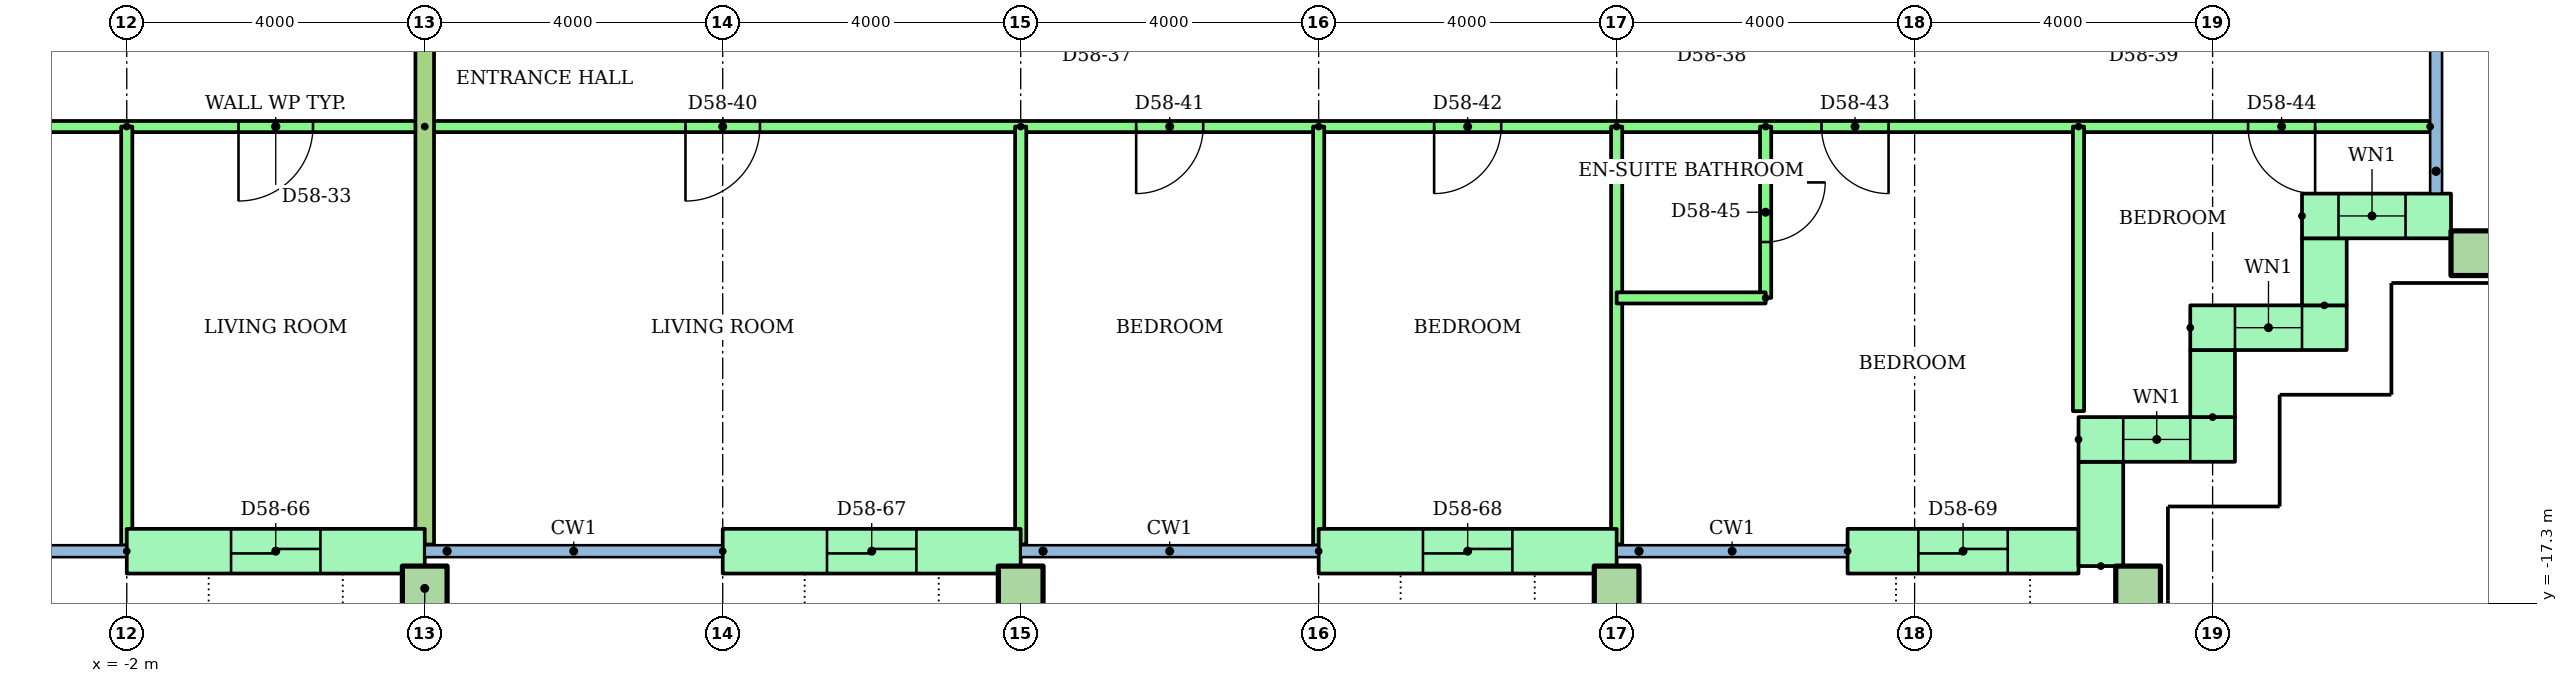
"""IFC4 building model, lengths in metres.
Left out: names, types, materials, properties, quantities, classifications, styles, units other than length and angle.
Written with IfcOpenShell. Run it as: python <this file> out.ifc"""

import sys

from ifc_helpers import new_model, si_unit, direction, frame, frame_2d, origin, origin_2d, place, context, subcontext, project, spatial, rectangle, hollow_rectangle, extrude, element, fill, save


model = new_model("IFC4")
c1 = context("Model", 3, precision=1e-05, world=origin(), true_north=direction((0.0, 1.0)))
c2 = subcontext(c1, "Body", "Model", "MODEL_VIEW")
j1 = project(units=[si_unit("LENGTHUNIT", "METRE"), si_unit("PLANEANGLEUNIT", "RADIAN")], contexts=[c1])
p1 = place(None, origin())
s1 = spatial("IfcSite", under=j1, at=p1, CompositionType="ELEMENT")
p2 = place(p1, origin())
s2 = spatial("IfcBuilding", under=s1, at=p2, CompositionType="ELEMENT")
p3 = place(p2, frame((0.0, 0.0, 223.6)))
s3 = spatial("IfcBuildingStorey", under=s2, at=p3, CompositionType="ELEMENT", Elevation=223.6)
for number, where in (
    (1, (2.0, -17.1, 0.0)),
    (2, (10.0, -17.1, 0.0)),
    (3, (18.0, -17.1, 0.0)),
    (4, (25.0, -17.1, 0.0)),
    (5, (29.5, -12.6, 0.0)),
):
    element("IfcColumn", number, at=place(p3, frame(where)), inside=s3, PredefinedType="COLUMN", context=c2, shape_type="SweptSolid", body=[
        extrude(hollow_rectangle(XDim=0.6, YDim=0.6, WallThickness=0.03, at=origin_2d()), origin(), (0.0, 0.0, 1.0), 3.2),
    ])
p4 = place(p3, frame((-2.0, -16.6, 0.0)))
e6 = element("IfcWall", 6, at=p4, inside=s3, PredefinedType="STANDARD", context=c2, shape_type="SweptSolid", body=[
    extrude(rectangle(XDim=4.0, YDim=0.6, at=frame_2d((2.0, 0.0))), origin(), (0.0, 0.0, 1.0), 2.92),
])
p5 = place(p4, frame((1.4, 0.0, 0.0)))
e7 = element("IfcOpeningElement", 7, at=p5, cuts=e6, PredefinedType="OPENING", context=c2, shape_type="SweptSolid", body=[
    extrude(rectangle(XDim=1.2, YDim=2.1, at=frame_2d((0.6, 1.05))), frame((0.0, 0.31, 0.0), z_axis=(0.0, -1.0, 0.0), x_axis=(1.0, 0.0, 0.0)), (0.0, 0.0, 1.0), 0.62),
])
p6 = place(p3, frame((6.0, -16.6, 0.0)))
e8 = element("IfcWall", 8, at=p6, inside=s3, PredefinedType="STANDARD", context=c2, shape_type="SweptSolid", body=[
    extrude(rectangle(XDim=4.0, YDim=0.6, at=frame_2d((2.0, 0.0))), origin(), (0.0, 0.0, 1.0), 2.92),
])
p7 = place(p6, frame((1.4, 0.0, 0.0)))
e9 = element("IfcOpeningElement", 9, at=p7, cuts=e8, PredefinedType="OPENING", context=c2, shape_type="SweptSolid", body=[
    extrude(rectangle(XDim=1.2, YDim=2.1, at=frame_2d((0.6, 1.05))), frame((0.0, 0.31, 0.0), z_axis=(0.0, -1.0, 0.0), x_axis=(1.0, 0.0, 0.0)), (0.0, 0.0, 1.0), 0.62),
])
p8 = place(p3, frame((14.0, -16.6, 0.0)))
e10 = element("IfcWall", 10, at=p8, inside=s3, PredefinedType="STANDARD", context=c2, shape_type="SweptSolid", body=[
    extrude(rectangle(XDim=4.0, YDim=0.6, at=frame_2d((2.0, 0.0))), origin(), (0.0, 0.0, 1.0), 2.92),
])
p9 = place(p8, frame((1.4, 0.0, 0.0)))
e11 = element("IfcOpeningElement", 11, at=p9, cuts=e10, PredefinedType="OPENING", context=c2, shape_type="SweptSolid", body=[
    extrude(rectangle(XDim=1.2, YDim=2.1, at=frame_2d((0.6, 1.05))), frame((0.0, 0.31, 0.0), z_axis=(0.0, -1.0, 0.0), x_axis=(1.0, 0.0, 0.0)), (0.0, 0.0, 1.0), 0.62),
])
p10 = place(p3, frame((21.1, -16.6, 0.0)))
e12 = element("IfcWall", 12, at=p10, inside=s3, PredefinedType="STANDARD", context=c2, shape_type="SweptSolid", body=[
    extrude(rectangle(XDim=3.1, YDim=0.6, at=frame_2d((1.55, 0.0))), origin(), (0.0, 0.0, 1.0), 2.92),
])
p11 = place(p10, frame((0.95, 0.0, 0.0)))
e13 = element("IfcOpeningElement", 13, at=p11, cuts=e12, PredefinedType="OPENING", context=c2, shape_type="SweptSolid", body=[
    extrude(rectangle(XDim=1.2, YDim=2.1, at=frame_2d((0.6, 1.05))), frame((0.0, 0.31, 0.0), z_axis=(0.0, -1.0, 0.0), x_axis=(1.0, 0.0, 0.0)), (0.0, 0.0, 1.0), 0.62),
])
p12 = place(p3, frame((24.5, -16.8, 0.0), z_axis=(0.0, 0.0, 1.0), x_axis=(0.0, 1.0, 0.0)))
e14 = element("IfcWall", 14, at=p12, inside=s3, PredefinedType="STANDARD", context=c2, shape_type="SweptSolid", body=[
    extrude(rectangle(XDim=1.4, YDim=0.6, at=frame_2d((0.7, 0.0))), origin(), (0.0, 0.0, 1.0), 2.92),
])
p13 = place(p3, frame((24.2, -15.1, 0.0)))
e15 = element("IfcWall", 15, at=p13, inside=s3, PredefinedType="STANDARD", context=c2, shape_type="SweptSolid", body=[
    extrude(rectangle(XDim=2.1, YDim=0.6, at=frame_2d((1.05, 0.0))), origin(), (0.0, 0.0, 1.0), 2.92),
])
p14 = place(p13, frame((0.6, 0.0, 0.9)))
e16 = element("IfcOpeningElement", 16, at=p14, cuts=e15, PredefinedType="OPENING", context=c2, shape_type="SweptSolid", body=[
    extrude(rectangle(XDim=0.9, YDim=1.5, at=frame_2d((0.45, 0.75))), frame((0.0, 0.31, 0.0), z_axis=(0.0, -1.0, 0.0), x_axis=(1.0, 0.0, 0.0)), (0.0, 0.0, 1.0), 0.62),
])
p15 = place(p3, frame((26.0, -14.8, 0.0), z_axis=(0.0, 0.0, 1.0), x_axis=(0.0, 1.0, 0.0)))
e17 = element("IfcWall", 17, at=p15, inside=s3, PredefinedType="STANDARD", context=c2, shape_type="SweptSolid", body=[
    extrude(rectangle(XDim=0.9, YDim=0.6, at=frame_2d((0.45, 0.0))), origin(), (0.0, 0.0, 1.0), 2.92),
])
p16 = place(p3, frame((25.7, -13.6, 0.0)))
e18 = element("IfcWall", 18, at=p16, inside=s3, PredefinedType="STANDARD", context=c2, shape_type="SweptSolid", body=[
    extrude(rectangle(XDim=2.1, YDim=0.6, at=frame_2d((1.05, 0.0))), origin(), (0.0, 0.0, 1.0), 2.92),
])
p17 = place(p16, frame((0.6, 0.0, 0.9)))
e19 = element("IfcOpeningElement", 19, at=p17, cuts=e18, PredefinedType="OPENING", context=c2, shape_type="SweptSolid", body=[
    extrude(rectangle(XDim=0.9, YDim=1.5, at=frame_2d((0.45, 0.75))), frame((0.0, 0.31, 0.0), z_axis=(0.0, -1.0, 0.0), x_axis=(1.0, 0.0, 0.0)), (0.0, 0.0, 1.0), 0.62),
])
p18 = place(p3, frame((27.5, -13.3, 0.0), z_axis=(0.0, 0.0, 1.0), x_axis=(0.0, 1.0, 0.0)))
e20 = element("IfcWall", 20, at=p18, inside=s3, PredefinedType="STANDARD", context=c2, shape_type="SweptSolid", body=[
    extrude(rectangle(XDim=0.9, YDim=0.6, at=frame_2d((0.45, 0.0))), origin(), (0.0, 0.0, 1.0), 2.92),
])
p19 = place(p3, frame((27.2, -12.1, 0.0)))
e21 = element("IfcWall", 21, at=p19, inside=s3, PredefinedType="STANDARD", context=c2, shape_type="SweptSolid", body=[
    extrude(rectangle(XDim=2.0, YDim=0.6, at=frame_2d((1.0, 0.0))), origin(), (0.0, 0.0, 1.0), 2.92),
])
p20 = place(p19, frame((0.49, 0.0, 0.9)))
e22 = element("IfcOpeningElement", 22, at=p20, cuts=e21, PredefinedType="OPENING", context=c2, shape_type="SweptSolid", body=[
    extrude(rectangle(XDim=0.9, YDim=1.5, at=frame_2d((0.45, 0.75))), frame((0.0, 0.31, 0.0), z_axis=(0.0, -1.0, 0.0), x_axis=(1.0, 0.0, 0.0)), (0.0, 0.0, 1.0), 0.62),
])
p21 = place(p3, frame((2.0, -10.9, 0.0), z_axis=(0.0, 0.0, 1.0), x_axis=(-1.0, 0.0, 0.0)))
e23 = element("IfcWall", 23, at=p21, inside=s3, PredefinedType="PARTITIONING", context=c2, shape_type="SweptSolid", body=[
    extrude(rectangle(XDim=8.0, YDim=0.15, at=frame_2d((4.0, 0.0))), origin(), (0.0, 0.0, 1.0), 2.4),
])
p22 = place(p21, frame((5.55, 0.0, 0.0)))
e24 = element("IfcOpeningElement", 24, at=p22, cuts=e23, PredefinedType="OPENING", context=c2, shape_type="SweptSolid", body=[
    extrude(rectangle(XDim=0.9, YDim=2.1, at=frame_2d((0.45, 1.05))), frame((0.0, 0.085, 0.0), z_axis=(0.0, -1.0, 0.0), x_axis=(1.0, 0.0, 0.0)), (0.0, 0.0, 1.0), 0.17),
])
p23 = place(p21, frame((1.5, 0.0, 0.0)))
e25 = element("IfcOpeningElement", 25, at=p23, cuts=e23, PredefinedType="OPENING", context=c2, shape_type="SweptSolid", body=[
    extrude(rectangle(XDim=1.0, YDim=2.1, at=frame_2d((0.5, 1.05))), frame((0.0, 0.085, 0.0), z_axis=(0.0, -1.0, 0.0), x_axis=(1.0, 0.0, 0.0)), (0.0, 0.0, 1.0), 0.17),
])
p24 = place(p3, frame((-2.0, -10.9, 0.0), z_axis=(0.0, 0.0, 1.0), x_axis=(0.0, -1.0, 0.0)))
e26 = element("IfcWall", 26, at=p24, inside=s3, PredefinedType="PARTITIONING", context=c2, shape_type="SweptSolid", body=[
    extrude(rectangle(XDim=5.621, YDim=0.15, at=frame_2d((2.811, 0.0))), origin(), (0.0, 0.0, 1.0), 2.4),
])
p25 = place(p3, frame((28.92, -10.9, 0.0), z_axis=(0.0, 0.0, 1.0), x_axis=(-1.0, 0.0, 0.0)))
e27 = element("IfcWall", 27, at=p25, inside=s3, PredefinedType="PARTITIONING", context=c2, shape_type="SweptSolid", body=[
    extrude(rectangle(XDim=26.92, YDim=0.15, at=frame_2d((13.46, 0.0))), origin(), (0.0, 0.0, 1.0), 2.4),
])
p26 = place(p25, frame((22.42, 0.0, 0.0)))
e28 = element("IfcOpeningElement", 28, at=p26, cuts=e27, PredefinedType="OPENING", context=c2, shape_type="SweptSolid", body=[
    extrude(rectangle(XDim=1.0, YDim=2.1, at=frame_2d((0.5, 1.05))), frame((0.0, 0.085, 0.0), z_axis=(0.0, -1.0, 0.0), x_axis=(1.0, 0.0, 0.0)), (0.0, 0.0, 1.0), 0.17),
])
p27 = place(p25, frame((16.47, 0.0, 0.0)))
e29 = element("IfcOpeningElement", 29, at=p27, cuts=e27, PredefinedType="OPENING", context=c2, shape_type="SweptSolid", body=[
    extrude(rectangle(XDim=0.9, YDim=2.1, at=frame_2d((0.45, 1.05))), frame((0.0, 0.085, 0.0), z_axis=(0.0, -1.0, 0.0), x_axis=(1.0, 0.0, 0.0)), (0.0, 0.0, 1.0), 0.17),
])
p28 = place(p25, frame((12.47, 0.0, 0.0)))
e30 = element("IfcOpeningElement", 30, at=p28, cuts=e27, PredefinedType="OPENING", context=c2, shape_type="SweptSolid", body=[
    extrude(rectangle(XDim=0.9, YDim=2.1, at=frame_2d((0.45, 1.05))), frame((0.0, 0.085, 0.0), z_axis=(0.0, -1.0, 0.0), x_axis=(1.0, 0.0, 0.0)), (0.0, 0.0, 1.0), 0.17),
])
p29 = place(p25, frame((7.27, 0.0, 0.0)))
e31 = element("IfcOpeningElement", 31, at=p29, cuts=e27, PredefinedType="OPENING", context=c2, shape_type="SweptSolid", body=[
    extrude(rectangle(XDim=0.9, YDim=2.1, at=frame_2d((0.45, 1.05))), frame((0.0, 0.085, 0.0), z_axis=(0.0, -1.0, 0.0), x_axis=(1.0, 0.0, 0.0)), (0.0, 0.0, 1.0), 0.17),
])
p30 = place(p25, frame((1.544, 0.0, 0.0)))
e32 = element("IfcOpeningElement", 32, at=p30, cuts=e27, PredefinedType="OPENING", context=c2, shape_type="SweptSolid", body=[
    extrude(rectangle(XDim=0.9, YDim=2.1, at=frame_2d((0.45, 1.05))), frame((0.0, 0.085, 0.0), z_axis=(0.0, -1.0, 0.0), x_axis=(1.0, 0.0, 0.0)), (0.0, 0.0, 1.0), 0.17),
])
p31 = place(p3, frame((10.0, -10.9, 0.0), z_axis=(0.0, 0.0, 1.0), x_axis=(0.0, -1.0, 0.0)))
e33 = element("IfcWall", 33, at=p31, inside=s3, PredefinedType="PARTITIONING", context=c2, shape_type="SweptSolid", body=[
    extrude(rectangle(XDim=5.61, YDim=0.15, at=frame_2d((2.805, 0.0))), origin(), (0.0, 0.0, 1.0), 2.4),
])
p32 = place(p3, frame((14.0, -10.9, 0.0), z_axis=(0.0, 0.0, 1.0), x_axis=(0.0, -1.0, 0.0)))
e34 = element("IfcWall", 34, at=p32, inside=s3, PredefinedType="PARTITIONING", context=c2, shape_type="SweptSolid", body=[
    extrude(rectangle(XDim=5.621, YDim=0.15, at=frame_2d((2.811, 0.0))), origin(), (0.0, 0.0, 1.0), 2.4),
])
p33 = place(p3, frame((18.0, -10.9, 0.0), z_axis=(0.0, 0.0, 1.0), x_axis=(0.0, -1.0, 0.0)))
e35 = element("IfcWall", 35, at=p33, inside=s3, PredefinedType="PARTITIONING", context=c2, shape_type="SweptSolid", body=[
    extrude(rectangle(XDim=5.61, YDim=0.15, at=frame_2d((2.805, 0.0))), origin(), (0.0, 0.0, 1.0), 2.4),
])
p34 = place(p3, frame((24.2, -10.9, 0.0), z_axis=(0.0, 0.0, 1.0), x_axis=(0.0, -1.0, 0.0)))
e36 = element("IfcWall", 36, at=p34, inside=s3, PredefinedType="PARTITIONING", context=c2, shape_type="SweptSolid", body=[
    extrude(rectangle(XDim=3.82, YDim=0.15, at=frame_2d((1.91, 0.0))), origin(), (0.0, 0.0, 1.0), 2.4),
])
p35 = place(p3, frame((20.0, -10.9, 0.0), z_axis=(0.0, 0.0, 1.0), x_axis=(0.0, -1.0, 0.0)))
e37 = element("IfcWall", 37, at=p35, inside=s3, PredefinedType="PARTITIONING", context=c2, shape_type="SweptSolid", body=[
    extrude(rectangle(XDim=2.3, YDim=0.15, at=frame_2d((1.15, 0.0))), origin(), (0.0, 0.0, 1.0), 2.4),
])
p36 = place(p35, frame((0.75, 0.0, 0.0)))
e38 = element("IfcOpeningElement", 38, at=p36, cuts=e37, PredefinedType="OPENING", context=c2, shape_type="SweptSolid", body=[
    extrude(rectangle(XDim=0.8, YDim=2.1, at=frame_2d((0.4, 1.05))), frame((0.0, 0.085, 0.0), z_axis=(0.0, -1.0, 0.0), x_axis=(1.0, 0.0, 0.0)), (0.0, 0.0, 1.0), 0.17),
])
p37 = place(p3, frame((20.0, -13.2, 0.0), z_axis=(0.0, 0.0, 1.0), x_axis=(-1.0, 0.0, 0.0)))
e39 = element("IfcWall", 39, at=p37, inside=s3, PredefinedType="PARTITIONING", context=c2, shape_type="SweptSolid", body=[
    extrude(rectangle(XDim=2.0, YDim=0.15, at=frame_2d((1.0, 0.0))), origin(), (0.0, 0.0, 1.0), 2.4),
])
p38 = place(p3, frame((2.0, -1.4, 0.0), z_axis=(0.0, 0.0, 1.0), x_axis=(0.0, -1.0, 0.0)))
e40 = element("IfcWall", 40, at=p38, inside=s3, PredefinedType="PARTITIONING", context=c2, shape_type="SweptSolid", body=[
    extrude(rectangle(XDim=15.11, YDim=0.25, at=frame_2d((7.555, 0.0))), origin(), (0.0, 0.0, 1.0), 2.4),
])
p39 = place(p14, origin())
e41 = element("IfcWindow", 41, at=p39, inside=s3, PartitioningType="SINGLE_PANEL", PredefinedType="WINDOW", context=c2, shape_type="SweptSolid", body=[
    extrude(rectangle(XDim=0.9, YDim=1.5, at=frame_2d((0.45, 0.75))), frame((0.0, 0.03, 0.0), z_axis=(0.0, -1.0, 0.0), x_axis=(1.0, 0.0, 0.0)), (0.0, 0.0, 1.0), 0.06),
])
fill(e16, e41)
p40 = place(p17, origin())
e42 = element("IfcWindow", 42, at=p40, inside=s3, PartitioningType="SINGLE_PANEL", PredefinedType="WINDOW", context=c2, shape_type="SweptSolid", body=[
    extrude(rectangle(XDim=0.9, YDim=1.5, at=frame_2d((0.45, 0.75))), frame((0.0, 0.03, 0.0), z_axis=(0.0, -1.0, 0.0), x_axis=(1.0, 0.0, 0.0)), (0.0, 0.0, 1.0), 0.06),
])
fill(e19, e42)
p41 = place(p20, origin())
e43 = element("IfcWindow", 43, at=p41, inside=s3, PartitioningType="SINGLE_PANEL", PredefinedType="WINDOW", context=c2, shape_type="SweptSolid", body=[
    extrude(rectangle(XDim=0.9, YDim=1.5, at=frame_2d((0.45, 0.75))), frame((0.0, 0.03, 0.0), z_axis=(0.0, -1.0, 0.0), x_axis=(1.0, 0.0, 0.0)), (0.0, 0.0, 1.0), 0.06),
])
fill(e22, e43)
p42 = place(p23, origin())
e44 = element("IfcDoor", 44, at=p42, inside=s3, OperationType="SINGLE_SWING_RIGHT", PredefinedType="DOOR", context=c2, shape_type="SweptSolid", body=[
    extrude(rectangle(XDim=1.0, YDim=2.1, at=frame_2d((0.5, 1.05))), frame((0.0, 0.025, 0.0), z_axis=(0.0, -1.0, 0.0), x_axis=(1.0, 0.0, 0.0)), (0.0, 0.0, 1.0), 0.05),
])
fill(e25, e44)
p43 = place(p26, origin())
e45 = element("IfcDoor", 45, at=p43, inside=s3, OperationType="SINGLE_SWING_RIGHT", PredefinedType="DOOR", context=c2, shape_type="SweptSolid", body=[
    extrude(rectangle(XDim=1.0, YDim=2.1, at=frame_2d((0.5, 1.05))), frame((0.0, 0.025, 0.0), z_axis=(0.0, -1.0, 0.0), x_axis=(1.0, 0.0, 0.0)), (0.0, 0.0, 1.0), 0.05),
])
fill(e28, e45)
p44 = place(p27, origin())
e46 = element("IfcDoor", 46, at=p44, inside=s3, OperationType="SINGLE_SWING_RIGHT", PredefinedType="DOOR", context=c2, shape_type="SweptSolid", body=[
    extrude(rectangle(XDim=0.9, YDim=2.1, at=frame_2d((0.45, 1.05))), frame((0.0, 0.025, 0.0), z_axis=(0.0, -1.0, 0.0), x_axis=(1.0, 0.0, 0.0)), (0.0, 0.0, 1.0), 0.05),
])
fill(e29, e46)
p45 = place(p28, origin())
e47 = element("IfcDoor", 47, at=p45, inside=s3, OperationType="SINGLE_SWING_RIGHT", PredefinedType="DOOR", context=c2, shape_type="SweptSolid", body=[
    extrude(rectangle(XDim=0.9, YDim=2.1, at=frame_2d((0.45, 1.05))), frame((0.0, 0.025, 0.0), z_axis=(0.0, -1.0, 0.0), x_axis=(1.0, 0.0, 0.0)), (0.0, 0.0, 1.0), 0.05),
])
fill(e30, e47)
p46 = place(p29, origin())
e48 = element("IfcDoor", 48, at=p46, inside=s3, OperationType="SINGLE_SWING_LEFT", PredefinedType="DOOR", context=c2, shape_type="SweptSolid", body=[
    extrude(rectangle(XDim=0.9, YDim=2.1, at=frame_2d((0.45, 1.05))), frame((0.0, 0.025, 0.0), z_axis=(0.0, -1.0, 0.0), x_axis=(1.0, 0.0, 0.0)), (0.0, 0.0, 1.0), 0.05),
])
fill(e31, e48)
p47 = place(p30, origin())
e49 = element("IfcDoor", 49, at=p47, inside=s3, OperationType="SINGLE_SWING_LEFT", PredefinedType="DOOR", context=c2, shape_type="SweptSolid", body=[
    extrude(rectangle(XDim=0.9, YDim=2.1, at=frame_2d((0.45, 1.05))), frame((0.0, 0.025, 0.0), z_axis=(0.0, -1.0, 0.0), x_axis=(1.0, 0.0, 0.0)), (0.0, 0.0, 1.0), 0.05),
])
fill(e32, e49)
p48 = place(p36, origin())
e50 = element("IfcDoor", 50, at=p48, inside=s3, OperationType="SINGLE_SWING_LEFT", PredefinedType="DOOR", context=c2, shape_type="SweptSolid", body=[
    extrude(rectangle(XDim=0.8, YDim=2.1, at=frame_2d((0.4, 1.05))), frame((0.0, 0.025, 0.0), z_axis=(0.0, -1.0, 0.0), x_axis=(1.0, 0.0, 0.0)), (0.0, 0.0, 1.0), 0.05),
])
fill(e38, e50)
p49 = place(p5, origin())
e51 = element("IfcDoor", 51, at=p49, inside=s3, OperationType="SLIDING_TO_LEFT", PredefinedType="DOOR", context=c2, shape_type="SweptSolid", body=[
    extrude(rectangle(XDim=1.2, YDim=2.1, at=frame_2d((0.6, 1.05))), frame((0.0, 0.025, 0.0), z_axis=(0.0, -1.0, 0.0), x_axis=(1.0, 0.0, 0.0)), (0.0, 0.0, 1.0), 0.05),
])
fill(e7, e51)
p50 = place(p7, origin())
e52 = element("IfcDoor", 52, at=p50, inside=s3, OperationType="SLIDING_TO_LEFT", PredefinedType="DOOR", context=c2, shape_type="SweptSolid", body=[
    extrude(rectangle(XDim=1.2, YDim=2.1, at=frame_2d((0.6, 1.05))), frame((0.0, 0.025, 0.0), z_axis=(0.0, -1.0, 0.0), x_axis=(1.0, 0.0, 0.0)), (0.0, 0.0, 1.0), 0.05),
])
fill(e9, e52)
p51 = place(p9, origin())
e53 = element("IfcDoor", 53, at=p51, inside=s3, OperationType="SLIDING_TO_LEFT", PredefinedType="DOOR", context=c2, shape_type="SweptSolid", body=[
    extrude(rectangle(XDim=1.2, YDim=2.1, at=frame_2d((0.6, 1.05))), frame((0.0, 0.025, 0.0), z_axis=(0.0, -1.0, 0.0), x_axis=(1.0, 0.0, 0.0)), (0.0, 0.0, 1.0), 0.05),
])
fill(e11, e53)
p52 = place(p11, origin())
e54 = element("IfcDoor", 54, at=p52, inside=s3, OperationType="SLIDING_TO_LEFT", PredefinedType="DOOR", context=c2, shape_type="SweptSolid", body=[
    extrude(rectangle(XDim=1.2, YDim=2.1, at=frame_2d((0.6, 1.05))), frame((0.0, 0.025, 0.0), z_axis=(0.0, -1.0, 0.0), x_axis=(1.0, 0.0, 0.0)), (0.0, 0.0, 1.0), 0.05),
])
fill(e13, e54)
save(model, sys.argv[1])
